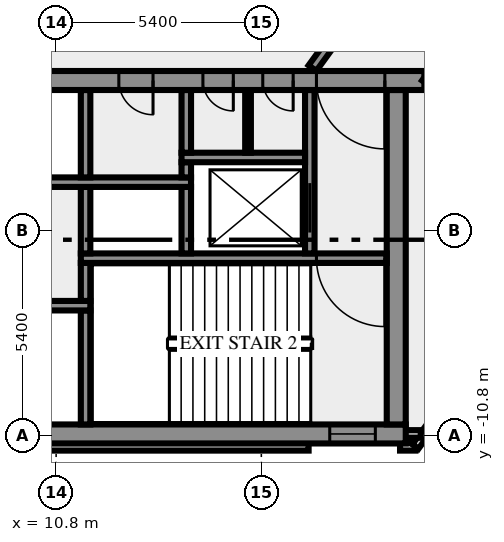
"""IFC4 building model, lengths in metres.
Left out: names, types, materials, properties, quantities, classifications, styles, units other than length and angle.
Written with IfcOpenShell. Run it as: python <this file> out.ifc"""

import sys

from ifc_helpers import new_model, si_unit, direction, frame, frame_2d, origin, place, context, subcontext, project, spatial, rectangle, extrude, element, fill, save


model = new_model("IFC4")
c1 = context("Model", 3, precision=1e-05, world=origin(), true_north=direction((0.0, 1.0)))
c2 = subcontext(c1, "Body", "Model", "MODEL_VIEW")
j1 = project(units=[si_unit("LENGTHUNIT", "METRE"), si_unit("PLANEANGLEUNIT", "RADIAN")], contexts=[c1])
p1 = place(None, origin())
s1 = spatial("IfcSite", under=j1, at=p1, CompositionType="ELEMENT")
p2 = place(p1, origin())
s2 = spatial("IfcBuilding", under=s1, at=p2, CompositionType="ELEMENT")
p3 = place(p2, frame((0.0, 0.0, 121.0)))
s3 = spatial("IfcBuildingStorey", under=s2, at=p3, CompositionType="ELEMENT", Elevation=121.0)
p4 = place(p3, frame((-17.444, -11.088, 0.0), z_axis=(0.0, 0.0, 1.0), x_axis=(1.0, 0.0, 0.0)))
e1 = element("IfcWall", 1, at=p4, inside=s3, PredefinedType="SOLIDWALL", context=c2, shape_type="SweptSolid", body=[
    extrude(rectangle(XDim=34.888, YDim=0.2, at=frame_2d((17.444, 0.0))), origin(), (0.0, 0.0, 1.0), 3.65),
])
p5 = place(p3, frame((19.85, -11.088, 0.0), z_axis=(0.0, 0.0, 1.0), x_axis=(1.0, 0.0, 0.0)))
e2 = element("IfcWall", 2, at=p5, inside=s3, PredefinedType="SOLIDWALL", context=c2, shape_type="SweptSolid", body=[
    extrude(rectangle(XDim=0.406, YDim=0.2, at=frame_2d((0.203, 0.0))), origin(), (0.0, 0.0, 1.0), 3.65),
])
p6 = place(p3, frame((20.253, -11.083, 0.0), z_axis=(0.0, 0.0, 1.0), x_axis=(0.587766567315, 0.809030569476, 0.0)))
e3 = element("IfcWall", 3, at=p6, inside=s3, PredefinedType="SOLIDWALL", context=c2, shape_type="SweptSolid", body=[
    extrude(rectangle(XDim=2.688, YDim=0.2, at=frame_2d((1.344, 0.0))), origin(), (0.0, 0.0, 1.0), 3.65),
])
p7 = place(p3, frame((19.98, -10.75, 0.0), z_axis=(0.0, 0.0, 1.0), x_axis=(1.0, 0.0, 0.0)))
e4 = element("IfcWall", 4, at=p7, inside=s3, PredefinedType="SOLIDWALL", context=c2, shape_type="SweptSolid", body=[
    extrude(rectangle(XDim=0.417, YDim=0.2, at=frame_2d((0.208, 0.0))), origin(), (0.0, 0.0, 1.0), 3.65),
])
p8 = place(p3, frame((-20.0, -10.75, 0.0), z_axis=(0.0, 0.0, 1.0), x_axis=(1.0, 0.0, 0.0)))
e5 = element("IfcWall", 5, at=p8, inside=s3, PredefinedType="SHEAR", context=c2, shape_type="SweptSolid", body=[
    extrude(rectangle(XDim=40.0, YDim=0.5, at=frame_2d((20.0, 0.0))), origin(), (0.0, 0.0, 1.0), 3.65),
])
p9 = place(p8, frame((0.8, 0.0, 1.0)))
e6 = element("IfcOpeningElement", 6, at=p9, cuts=e5, PredefinedType="OPENING", context=c2, shape_type="SweptSolid", body=[
    extrude(rectangle(XDim=1.2, YDim=1.2, at=frame_2d((0.6, 0.6))), frame((0.0, 0.26, 0.0), z_axis=(0.0, -1.0, 0.0), x_axis=(1.0, 0.0, 0.0)), (0.0, 0.0, 1.0), 0.52),
])
p10 = place(p8, frame((38.0, 0.0, 1.0)))
e7 = element("IfcOpeningElement", 7, at=p10, cuts=e5, PredefinedType="OPENING", context=c2, shape_type="SweptSolid", body=[
    extrude(rectangle(XDim=1.2, YDim=1.2, at=frame_2d((0.6, 0.6))), frame((0.0, 0.26, 0.0), z_axis=(0.0, -1.0, 0.0), x_axis=(1.0, 0.0, 0.0)), (0.0, 0.0, 1.0), 0.52),
])
p11 = place(p3, frame((11.575, -10.5, 0.0), z_axis=(0.0, 0.0, 1.0), x_axis=(0.0, 1.0, 0.0)))
e8 = element("IfcWall", 8, at=p11, inside=s3, PredefinedType="SHEAR", context=c2, shape_type="SweptSolid", body=[
    extrude(rectangle(XDim=3.0, YDim=0.25, at=frame_2d((1.5, 0.0))), origin(), (0.0, 0.0, 1.0), 3.65),
])
p12 = place(p3, frame((19.75, -10.5, 0.0), z_axis=(0.0, 0.0, 1.0), x_axis=(0.0, 1.0, 0.0)))
e9 = element("IfcWall", 9, at=p12, inside=s3, PredefinedType="SHEAR", context=c2, shape_type="SweptSolid", body=[
    extrude(rectangle(XDim=8.8, YDim=0.5, at=frame_2d((4.4, 0.0))), origin(), (0.0, 0.0, 1.0), 3.65),
])
p13 = place(p3, frame((11.7, -7.375, 0.0), z_axis=(0.0, 0.0, 1.0), x_axis=(-1.0, 0.0, 0.0)))
e10 = element("IfcWall", 10, at=p13, inside=s3, PredefinedType="SHEAR", context=c2, shape_type="SweptSolid", body=[
    extrude(rectangle(XDim=23.4, YDim=0.25, at=frame_2d((11.7, 0.0))), origin(), (0.0, 0.0, 1.0), 3.65),
])
p14 = place(p13, frame((21.45, 0.0, 0.0)))
e11 = element("IfcOpeningElement", 11, at=p14, cuts=e10, PredefinedType="OPENING", context=c2, shape_type="SweptSolid", body=[
    extrude(rectangle(XDim=1.1, YDim=2.1, at=frame_2d((0.55, 1.05))), frame((0.0, 0.135, 0.0), z_axis=(0.0, -1.0, 0.0), x_axis=(1.0, 0.0, 0.0)), (0.0, 0.0, 1.0), 0.27),
])
p15 = place(p13, frame((18.95, 0.0, 0.0)))
e12 = element("IfcOpeningElement", 12, at=p15, cuts=e10, PredefinedType="OPENING", context=c2, shape_type="SweptSolid", body=[
    extrude(rectangle(XDim=1.1, YDim=2.1, at=frame_2d((0.55, 1.05))), frame((0.0, 0.135, 0.0), z_axis=(0.0, -1.0, 0.0), x_axis=(1.0, 0.0, 0.0)), (0.0, 0.0, 1.0), 0.27),
])
p16 = place(p13, frame((16.45, 0.0, 0.0)))
e13 = element("IfcOpeningElement", 13, at=p16, cuts=e10, PredefinedType="OPENING", context=c2, shape_type="SweptSolid", body=[
    extrude(rectangle(XDim=1.1, YDim=2.1, at=frame_2d((0.55, 1.05))), frame((0.0, 0.135, 0.0), z_axis=(0.0, -1.0, 0.0), x_axis=(1.0, 0.0, 0.0)), (0.0, 0.0, 1.0), 0.27),
])
p17 = place(p13, frame((14.75, 0.0, 0.0)))
e14 = element("IfcOpeningElement", 14, at=p17, cuts=e10, PredefinedType="OPENING", context=c2, shape_type="SweptSolid", body=[
    extrude(rectangle(XDim=0.7, YDim=2.1, at=frame_2d((0.35, 1.05))), frame((0.0, 0.135, 0.0), z_axis=(0.0, -1.0, 0.0), x_axis=(1.0, 0.0, 0.0)), (0.0, 0.0, 1.0), 0.27),
])
p18 = place(p13, frame((13.35, 0.0, 0.0)))
e15 = element("IfcOpeningElement", 15, at=p18, cuts=e10, PredefinedType="OPENING", context=c2, shape_type="SweptSolid", body=[
    extrude(rectangle(XDim=0.9, YDim=2.1, at=frame_2d((0.45, 1.05))), frame((0.0, 0.135, 0.0), z_axis=(0.0, -1.0, 0.0), x_axis=(1.0, 0.0, 0.0)), (0.0, 0.0, 1.0), 0.27),
])
p19 = place(p13, frame((11.975, 0.0, 0.0)))
e16 = element("IfcOpeningElement", 16, at=p19, cuts=e10, PredefinedType="OPENING", context=c2, shape_type="SweptSolid", body=[
    extrude(rectangle(XDim=0.9, YDim=2.1, at=frame_2d((0.45, 1.05))), frame((0.0, 0.135, 0.0), z_axis=(0.0, -1.0, 0.0), x_axis=(1.0, 0.0, 0.0)), (0.0, 0.0, 1.0), 0.27),
])
p20 = place(p13, frame((10.5, 0.0, 0.0)))
e17 = element("IfcOpeningElement", 17, at=p20, cuts=e10, PredefinedType="OPENING", context=c2, shape_type="SweptSolid", body=[
    extrude(rectangle(XDim=0.9, YDim=2.1, at=frame_2d((0.45, 1.05))), frame((0.0, 0.135, 0.0), z_axis=(0.0, -1.0, 0.0), x_axis=(1.0, 0.0, 0.0)), (0.0, 0.0, 1.0), 0.27),
])
p21 = place(p3, frame((11.575, -7.25, 0.0), z_axis=(0.0, 0.0, 1.0), x_axis=(0.0, 1.0, 0.0)))
e18 = element("IfcWall", 18, at=p21, inside=s3, PredefinedType="SHEAR", context=c2, shape_type="SweptSolid", body=[
    extrude(rectangle(XDim=1.0, YDim=0.25, at=frame_2d((0.5, 0.0))), origin(), (0.0, 0.0, 1.0), 3.65),
])
p22 = place(p3, frame((19.5, -6.125, 0.0), z_axis=(0.0, 0.0, 1.0), x_axis=(-1.0, 0.0, 0.0)))
e19 = element("IfcWall", 19, at=p22, inside=s3, PredefinedType="SHEAR", context=c2, shape_type="SweptSolid", body=[
    extrude(rectangle(XDim=8.05, YDim=0.25, at=frame_2d((4.025, 0.0))), origin(), (0.0, 0.0, 1.0), 3.65),
])
p23 = place(p22, frame((0.05, 0.0, 0.0)))
e20 = element("IfcOpeningElement", 20, at=p23, cuts=e19, PredefinedType="OPENING", context=c2, shape_type="SweptSolid", body=[
    extrude(rectangle(XDim=1.8, YDim=2.1, at=frame_2d((0.9, 1.05))), frame((0.0, 0.135, 0.0), z_axis=(0.0, -1.0, 0.0), x_axis=(1.0, 0.0, 0.0)), (0.0, 0.0, 1.0), 0.27),
])
for number, where, z_axis, x_axis in (
    (21, (11.575, -6.0, 0.0), (0.0, 0.0, 1.0), (0.0, 1.0, 0.0)),
    (22, (14.225, -6.0, 0.0), (0.0, 0.0, 1.0), (0.0, 1.0, 0.0)),
):
    element("IfcWall", number, at=place(p3, frame(where, z_axis=z_axis, x_axis=x_axis)), inside=s3, PredefinedType="SHEAR", context=c2, shape_type="SweptSolid", body=[
        extrude(rectangle(XDim=1.75, YDim=0.25, at=frame_2d((0.875, 0.0))), origin(), (0.0, 0.0, 1.0), 3.65),
    ])
p24 = place(p3, frame((17.475, -6.0, 0.0), z_axis=(0.0, 0.0, 1.0), x_axis=(0.0, 1.0, 0.0)))
e23 = element("IfcWall", 23, at=p24, inside=s3, PredefinedType="SHEAR", context=c2, shape_type="SweptSolid", body=[
    extrude(rectangle(XDim=4.3, YDim=0.25, at=frame_2d((2.15, 0.0))), origin(), (0.0, 0.0, 1.0), 3.65),
])
p25 = place(p24, frame((0.55, 0.0, 0.0)))
e24 = element("IfcOpeningElement", 24, at=p25, cuts=e23, PredefinedType="OPENING", context=c2, shape_type="SweptSolid", body=[
    extrude(rectangle(XDim=1.3, YDim=2.1, at=frame_2d((0.65, 1.05))), frame((0.0, 0.135, 0.0), z_axis=(0.0, -1.0, 0.0), x_axis=(1.0, 0.0, 0.0)), (0.0, 0.0, 1.0), 0.27),
])
p26 = place(p3, frame((1.45, -4.125, 0.0), z_axis=(0.0, 0.0, 1.0), x_axis=(1.0, 0.0, 0.0)))
e25 = element("IfcWall", 25, at=p26, inside=s3, PredefinedType="SHEAR", context=c2, shape_type="SweptSolid", body=[
    extrude(rectangle(XDim=12.9, YDim=0.25, at=frame_2d((6.45, 0.0))), origin(), (0.0, 0.0, 1.0), 3.65),
])
p27 = place(p26, frame((0.7, 0.0, 0.0)))
e26 = element("IfcOpeningElement", 26, at=p27, cuts=e25, PredefinedType="OPENING", context=c2, shape_type="SweptSolid", body=[
    extrude(rectangle(XDim=1.3, YDim=2.1, at=frame_2d((0.65, 1.05))), frame((0.0, 0.135, 0.0), z_axis=(0.0, -1.0, 0.0), x_axis=(1.0, 0.0, 0.0)), (0.0, 0.0, 1.0), 0.27),
])
p28 = place(p3, frame((11.575, -4.0, 0.0), z_axis=(0.0, 0.0, 1.0), x_axis=(0.0, 1.0, 0.0)))
e27 = element("IfcWall", 27, at=p28, inside=s3, PredefinedType="SHEAR", context=c2, shape_type="SweptSolid", body=[
    extrude(rectangle(XDim=2.3, YDim=0.25, at=frame_2d((1.15, 0.0))), origin(), (0.0, 0.0, 1.0), 3.65),
])
p29 = place(p3, frame((14.225, -4.0, 0.0), z_axis=(0.0, 0.0, 1.0), x_axis=(0.0, 1.0, 0.0)))
e28 = element("IfcWall", 28, at=p29, inside=s3, PredefinedType="SHEAR", context=c2, shape_type="SweptSolid", body=[
    extrude(rectangle(XDim=0.4, YDim=0.25, at=frame_2d((0.2, 0.0))), origin(), (0.0, 0.0, 1.0), 3.65),
])
p30 = place(p3, frame((14.1, -3.475, 0.0), z_axis=(0.0, 0.0, 1.0), x_axis=(1.0, 0.0, 0.0)))
e29 = element("IfcWall", 29, at=p30, inside=s3, PredefinedType="SHEAR", context=c2, shape_type="SweptSolid", body=[
    extrude(rectangle(XDim=3.25, YDim=0.25, at=frame_2d((1.625, 0.0))), origin(), (0.0, 0.0, 1.0), 3.65),
])
p31 = place(p3, frame((14.225, -3.35, 0.0), z_axis=(0.0, 0.0, 1.0), x_axis=(0.0, 1.0, 0.0)))
e30 = element("IfcWall", 30, at=p31, inside=s3, PredefinedType="SHEAR", context=c2, shape_type="SweptSolid", body=[
    extrude(rectangle(XDim=1.65, YDim=0.25, at=frame_2d((0.825, 0.0))), origin(), (0.0, 0.0, 1.0), 3.65),
])
p32 = place(p3, frame((15.85, -3.35, 0.0), z_axis=(0.0, 0.0, 1.0), x_axis=(0.0, 1.0, 0.0)))
e31 = element("IfcWall", 31, at=p32, inside=s3, PredefinedType="PARTITIONING", context=c2, shape_type="SweptSolid", body=[
    extrude(rectangle(XDim=1.65, YDim=0.15, at=frame_2d((0.825, 0.0))), origin(), (0.0, 0.0, 1.0), 3.65),
])
p33 = place(p3, frame((20.49, -1.45, 0.0), z_axis=(0.0, 0.0, 1.0), x_axis=(-1.0, 0.0, 0.0)))
e32 = element("IfcWall", 32, at=p33, inside=s3, PredefinedType="SHEAR", context=c2, shape_type="SweptSolid", body=[
    extrude(rectangle(XDim=40.98, YDim=0.5, at=frame_2d((20.49, 0.0))), origin(), (0.0, 0.0, 1.0), 3.65),
])
p34 = place(p33, frame((38.14, 0.0, 0.0)))
e33 = element("IfcOpeningElement", 33, at=p34, cuts=e32, PredefinedType="OPENING", context=c2, shape_type="SweptSolid", body=[
    extrude(rectangle(XDim=1.8, YDim=2.1, at=frame_2d((0.9, 1.05))), frame((0.0, 0.26, 0.0), z_axis=(0.0, -1.0, 0.0), x_axis=(1.0, 0.0, 0.0)), (0.0, 0.0, 1.0), 0.52),
])
p35 = place(p33, frame((35.89, 0.0, 0.0)))
e34 = element("IfcOpeningElement", 34, at=p35, cuts=e32, PredefinedType="OPENING", context=c2, shape_type="SweptSolid", body=[
    extrude(rectangle(XDim=0.9, YDim=2.1, at=frame_2d((0.45, 1.05))), frame((0.0, 0.26, 0.0), z_axis=(0.0, -1.0, 0.0), x_axis=(1.0, 0.0, 0.0)), (0.0, 0.0, 1.0), 0.52),
])
p36 = place(p33, frame((32.94, 0.0, 0.0)))
e35 = element("IfcOpeningElement", 35, at=p36, cuts=e32, PredefinedType="OPENING", context=c2, shape_type="SweptSolid", body=[
    extrude(rectangle(XDim=0.9, YDim=2.1, at=frame_2d((0.45, 1.05))), frame((0.0, 0.26, 0.0), z_axis=(0.0, -1.0, 0.0), x_axis=(1.0, 0.0, 0.0)), (0.0, 0.0, 1.0), 0.52),
])
p37 = place(p33, frame((19.59, 0.0, 0.0)))
e36 = element("IfcOpeningElement", 36, at=p37, cuts=e32, PredefinedType="OPENING", context=c2, shape_type="SweptSolid", body=[
    extrude(rectangle(XDim=2.0, YDim=2.1, at=frame_2d((1.0, 1.05))), frame((0.0, 0.26, 0.0), z_axis=(0.0, -1.0, 0.0), x_axis=(1.0, 0.0, 0.0)), (0.0, 0.0, 1.0), 0.52),
])
p38 = place(p33, frame((7.14, 0.0, 0.0)))
e37 = element("IfcOpeningElement", 37, at=p38, cuts=e32, PredefinedType="OPENING", context=c2, shape_type="SweptSolid", body=[
    extrude(rectangle(XDim=0.9, YDim=2.1, at=frame_2d((0.45, 1.05))), frame((0.0, 0.26, 0.0), z_axis=(0.0, -1.0, 0.0), x_axis=(1.0, 0.0, 0.0)), (0.0, 0.0, 1.0), 0.52),
])
p39 = place(p33, frame((5.028, 0.0, 0.0)))
e38 = element("IfcOpeningElement", 38, at=p39, cuts=e32, PredefinedType="OPENING", context=c2, shape_type="SweptSolid", body=[
    extrude(rectangle(XDim=0.8, YDim=2.1, at=frame_2d((0.4, 1.05))), frame((0.0, 0.26, 0.0), z_axis=(0.0, -1.0, 0.0), x_axis=(1.0, 0.0, 0.0)), (0.0, 0.0, 1.0), 0.52),
])
p40 = place(p33, frame((3.452, 0.0, 0.0)))
e39 = element("IfcOpeningElement", 39, at=p40, cuts=e32, PredefinedType="OPENING", context=c2, shape_type="SweptSolid", body=[
    extrude(rectangle(XDim=0.8, YDim=2.1, at=frame_2d((0.4, 1.05))), frame((0.0, 0.26, 0.0), z_axis=(0.0, -1.0, 0.0), x_axis=(1.0, 0.0, 0.0)), (0.0, 0.0, 1.0), 0.52),
])
p41 = place(p33, frame((1.04, 0.0, 0.0)))
e40 = element("IfcOpeningElement", 40, at=p41, cuts=e32, PredefinedType="OPENING", context=c2, shape_type="SweptSolid", body=[
    extrude(rectangle(XDim=1.8, YDim=2.1, at=frame_2d((0.9, 1.05))), frame((0.0, 0.26, 0.0), z_axis=(0.0, -1.0, 0.0), x_axis=(1.0, 0.0, 0.0)), (0.0, 0.0, 1.0), 0.52),
])
p42 = place(p3, frame((17.545, -1.125, 0.0), z_axis=(0.0, 0.0, 1.0), x_axis=(0.587786330937, 0.809016210693, 0.0)))
e41 = element("IfcWall", 41, at=p42, inside=s3, PredefinedType="SOLIDWALL", context=c2, shape_type="SweptSolid", body=[
    extrude(rectangle(XDim=30.103, YDim=0.25, at=frame_2d((15.052, 0.0))), origin(), (0.0, 0.0, 1.0), 3.65),
])
p43 = place(p42, frame((3.441, 0.0, 0.0)))
e42 = element("IfcOpeningElement", 42, at=p43, cuts=e41, PredefinedType="OPENING", context=c2, shape_type="SweptSolid", body=[
    extrude(rectangle(XDim=0.9, YDim=2.1, at=frame_2d((0.45, 1.05))), frame((0.0, 0.135, 0.0), z_axis=(0.0, -1.0, 0.0), x_axis=(1.0, 0.0, 0.0)), (0.0, 0.0, 1.0), 0.27),
])
p44 = place(p42, frame((28.729, 0.0, 0.0)))
e43 = element("IfcOpeningElement", 43, at=p44, cuts=e41, PredefinedType="OPENING", context=c2, shape_type="SweptSolid", body=[
    extrude(rectangle(XDim=0.9, YDim=2.1, at=frame_2d((0.45, 1.05))), frame((0.0, 0.135, 0.0), z_axis=(0.0, -1.0, 0.0), x_axis=(1.0, 0.0, 0.0)), (0.0, 0.0, 1.0), 0.27),
])
p45 = place(p3, frame((37.236, 21.469, 0.0), z_axis=(0.0, 0.0, 1.0), x_axis=(-0.58778344073, -0.809018310549, 0.0)))
e44 = element("IfcWall", 44, at=p45, inside=s3, PredefinedType="SOLIDWALL", context=c2, shape_type="SweptSolid", body=[
    extrude(rectangle(XDim=28.42, YDim=0.25, at=frame_2d((14.21, 0.0))), origin(), (0.0, 0.0, 1.0), 3.65),
])
p46 = place(p45, frame((13.205, 0.0, 0.0)))
e45 = element("IfcOpeningElement", 45, at=p46, cuts=e44, PredefinedType="OPENING", context=c2, shape_type="SweptSolid", body=[
    extrude(rectangle(XDim=1.0, YDim=2.1, at=frame_2d((0.5, 1.05))), frame((0.0, 0.135, 0.0), z_axis=(0.0, -1.0, 0.0), x_axis=(1.0, 0.0, 0.0)), (0.0, 0.0, 1.0), 0.27),
])
p47 = place(p45, frame((0.224, 0.0, 0.0)))
e46 = element("IfcOpeningElement", 46, at=p47, cuts=e44, PredefinedType="OPENING", context=c2, shape_type="SweptSolid", body=[
    extrude(rectangle(XDim=0.9, YDim=2.1, at=frame_2d((0.45, 1.05))), frame((0.0, 0.135, 0.0), z_axis=(0.0, -1.0, 0.0), x_axis=(1.0, 0.0, 0.0)), (0.0, 0.0, 1.0), 0.27),
])
p48 = place(p10, origin())
e47 = element("IfcWindow", 47, at=p48, inside=s3, PartitioningType="SINGLE_PANEL", PredefinedType="WINDOW", context=c2, shape_type="SweptSolid", body=[
    extrude(rectangle(XDim=1.2, YDim=1.2, at=frame_2d((0.6, 0.6))), frame((0.0, 0.03, 0.0), z_axis=(0.0, -1.0, 0.0), x_axis=(1.0, 0.0, 0.0)), (0.0, 0.0, 1.0), 0.06),
])
fill(e7, e47)
p49 = place(p23, origin())
e48 = element("IfcDoor", 48, at=p49, inside=s3, OperationType="DOUBLE_DOOR_SINGLE_SWING", PredefinedType="DOOR", context=c2, shape_type="SweptSolid", body=[
    extrude(rectangle(XDim=1.8, YDim=2.1, at=frame_2d((0.9, 1.05))), frame((0.0, 0.025, 0.0), z_axis=(0.0, -1.0, 0.0), x_axis=(1.0, 0.0, 0.0)), (0.0, 0.0, 1.0), 0.05),
])
fill(e20, e48)
p50 = place(p25, origin())
e49 = element("IfcDoor", 49, at=p50, inside=s3, OperationType="DOUBLE_DOOR_SLIDING", PredefinedType="DOOR", context=c2, shape_type="SweptSolid", body=[
    extrude(rectangle(XDim=1.3, YDim=2.1, at=frame_2d((0.65, 1.05))), frame((0.0, 0.025, 0.0), z_axis=(0.0, -1.0, 0.0), x_axis=(1.0, 0.0, 0.0)), (0.0, 0.0, 1.0), 0.05),
])
fill(e24, e49)
p51 = place(p38, origin())
e50 = element("IfcDoor", 50, at=p51, inside=s3, OperationType="SINGLE_SWING_LEFT", PredefinedType="DOOR", context=c2, shape_type="SweptSolid", body=[
    extrude(rectangle(XDim=0.9, YDim=2.1, at=frame_2d((0.45, 1.05))), frame((0.0, 0.025, 0.0), z_axis=(0.0, -1.0, 0.0), x_axis=(1.0, 0.0, 0.0)), (0.0, 0.0, 1.0), 0.05),
])
fill(e37, e50)
p52 = place(p39, origin())
e51 = element("IfcDoor", 51, at=p52, inside=s3, OperationType="SINGLE_SWING_LEFT", PredefinedType="DOOR", context=c2, shape_type="SweptSolid", body=[
    extrude(rectangle(XDim=0.8, YDim=2.1, at=frame_2d((0.4, 1.05))), frame((0.0, 0.025, 0.0), z_axis=(0.0, -1.0, 0.0), x_axis=(1.0, 0.0, 0.0)), (0.0, 0.0, 1.0), 0.05),
])
fill(e38, e51)
p53 = place(p40, origin())
e52 = element("IfcDoor", 52, at=p53, inside=s3, OperationType="SINGLE_SWING_LEFT", PredefinedType="DOOR", context=c2, shape_type="SweptSolid", body=[
    extrude(rectangle(XDim=0.8, YDim=2.1, at=frame_2d((0.4, 1.05))), frame((0.0, 0.025, 0.0), z_axis=(0.0, -1.0, 0.0), x_axis=(1.0, 0.0, 0.0)), (0.0, 0.0, 1.0), 0.05),
])
fill(e39, e52)
p54 = place(p41, origin())
e53 = element("IfcDoor", 53, at=p54, inside=s3, OperationType="DOUBLE_DOOR_SINGLE_SWING", PredefinedType="DOOR", context=c2, shape_type="SweptSolid", body=[
    extrude(rectangle(XDim=1.8, YDim=2.1, at=frame_2d((0.9, 1.05))), frame((0.0, 0.025, 0.0), z_axis=(0.0, -1.0, 0.0), x_axis=(1.0, 0.0, 0.0)), (0.0, 0.0, 1.0), 0.05),
])
fill(e40, e53)
save(model, sys.argv[1])
